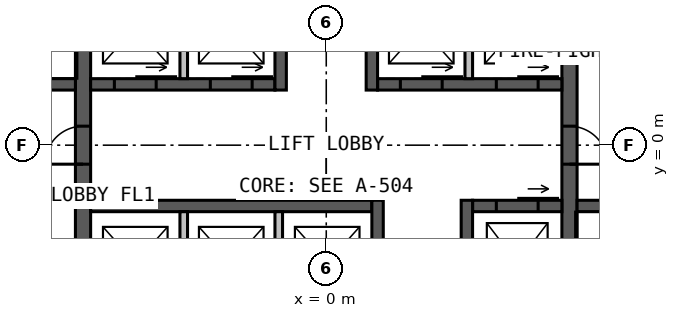
"""IFC4 building model, lengths in metres.
Left out: names, types, materials, properties, quantities, classifications, styles, units other than length and angle.
Written with IfcOpenShell. Run it as: python <this file> out.ifc"""

import sys

from ifc_helpers import new_model, si_unit, direction, frame, frame_2d, origin, place, context, subcontext, project, spatial, rectangle, extrude, element, fill, save


model = new_model("IFC4")
c1 = context("Model", 3, precision=1e-05, world=origin(), true_north=direction((0.0, 1.0)))
c2 = subcontext(c1, "Body", "Model", "MODEL_VIEW")
j1 = project(units=[si_unit("LENGTHUNIT", "METRE"), si_unit("PLANEANGLEUNIT", "RADIAN")], contexts=[c1])
p1 = place(None, origin())
s1 = spatial("IfcSite", under=j1, at=p1, CompositionType="ELEMENT")
p2 = place(p1, origin())
s2 = spatial("IfcBuilding", under=s1, at=p2, CompositionType="ELEMENT")
p3 = place(p2, frame((0.0, 0.0, 138.0)))
s3 = spatial("IfcBuildingStorey", under=s2, at=p3, CompositionType="ELEMENT", Elevation=138.0)
p4 = place(p3, frame((-6.4, -9.45, 0.0), z_axis=(0.0, 0.0, 1.0), x_axis=(0.0, 1.0, 0.0)))
e1 = element("IfcWall", 1, at=p4, inside=s3, PredefinedType="SOLIDWALL", context=c2, shape_type="SweptSolid", body=[
    extrude(rectangle(XDim=18.9, YDim=0.4, at=frame_2d((9.45, 0.0))), origin(), (0.0, 0.0, 1.0), 4.0),
])
p5 = place(p4, frame((8.95, 0.0, 0.0)))
e2 = element("IfcOpeningElement", 2, at=p5, cuts=e1, PredefinedType="OPENING", context=c2, shape_type="SweptSolid", body=[
    extrude(rectangle(XDim=1.0, YDim=2.2, at=frame_2d((0.5, 1.1))), frame((0.0, 0.21, 0.0), z_axis=(0.0, -1.0, 0.0), x_axis=(1.0, 0.0, 0.0)), (0.0, 0.0, 1.0), 0.42),
])
p6 = place(p3, frame((6.4, 9.45, 0.0), z_axis=(0.0, 0.0, 1.0), x_axis=(0.0, -1.0, 0.0)))
e3 = element("IfcWall", 3, at=p6, inside=s3, PredefinedType="SOLIDWALL", context=c2, shape_type="SweptSolid", body=[
    extrude(rectangle(XDim=18.9, YDim=0.4, at=frame_2d((9.45, 0.0))), origin(), (0.0, 0.0, 1.0), 4.0),
])
p7 = place(p6, frame((8.95, 0.0, 0.0)))
e4 = element("IfcOpeningElement", 4, at=p7, cuts=e3, PredefinedType="OPENING", context=c2, shape_type="SweptSolid", body=[
    extrude(rectangle(XDim=1.0, YDim=2.2, at=frame_2d((0.5, 1.1))), frame((0.0, 0.21, 0.0), z_axis=(0.0, -1.0, 0.0), x_axis=(1.0, 0.0, 0.0)), (0.0, 0.0, 1.0), 0.42),
])
p8 = place(p3, frame((-6.2, 1.6, 0.0), z_axis=(0.0, 0.0, 1.0), x_axis=(1.0, 0.0, 0.0)))
e5 = element("IfcWall", 5, at=p8, inside=s3, PredefinedType="SOLIDWALL", context=c2, shape_type="SweptSolid", body=[
    extrude(rectangle(XDim=4.85, YDim=0.3, at=frame_2d((2.425, 0.0))), origin(), (0.0, 0.0, 1.0), 4.0),
])
p9 = place(p8, frame((0.625, 0.0, 0.0)))
e6 = element("IfcOpeningElement", 6, at=p9, cuts=e5, PredefinedType="OPENING", context=c2, shape_type="SweptSolid", body=[
    extrude(rectangle(XDim=1.1, YDim=2.2, at=frame_2d((0.55, 1.1))), frame((0.0, 0.16, 0.0), z_axis=(0.0, -1.0, 0.0), x_axis=(1.0, 0.0, 0.0)), (0.0, 0.0, 1.0), 0.32),
])
p10 = place(p8, frame((3.15, 0.0, 0.0)))
e7 = element("IfcOpeningElement", 7, at=p10, cuts=e5, PredefinedType="OPENING", context=c2, shape_type="SweptSolid", body=[
    extrude(rectangle(XDim=1.1, YDim=2.2, at=frame_2d((0.55, 1.1))), frame((0.0, 0.16, 0.0), z_axis=(0.0, -1.0, 0.0), x_axis=(1.0, 0.0, 0.0)), (0.0, 0.0, 1.0), 0.32),
])
p11 = place(p3, frame((1.35, 1.6, 0.0), z_axis=(0.0, 0.0, 1.0), x_axis=(1.0, 0.0, 0.0)))
e8 = element("IfcWall", 8, at=p11, inside=s3, PredefinedType="SOLIDWALL", context=c2, shape_type="SweptSolid", body=[
    extrude(rectangle(XDim=4.85, YDim=0.3, at=frame_2d((2.425, 0.0))), origin(), (0.0, 0.0, 1.0), 4.0),
])
p12 = place(p11, frame((0.6, 0.0, 0.0)))
e9 = element("IfcOpeningElement", 9, at=p12, cuts=e8, PredefinedType="OPENING", context=c2, shape_type="SweptSolid", body=[
    extrude(rectangle(XDim=1.1, YDim=2.2, at=frame_2d((0.55, 1.1))), frame((0.0, 0.16, 0.0), z_axis=(0.0, -1.0, 0.0), x_axis=(1.0, 0.0, 0.0)), (0.0, 0.0, 1.0), 0.32),
])
p13 = place(p11, frame((3.125, 0.0, 0.0)))
e10 = element("IfcOpeningElement", 10, at=p13, cuts=e8, PredefinedType="OPENING", context=c2, shape_type="SweptSolid", body=[
    extrude(rectangle(XDim=1.1, YDim=2.2, at=frame_2d((0.55, 1.1))), frame((0.0, 0.16, 0.0), z_axis=(0.0, -1.0, 0.0), x_axis=(1.0, 0.0, 0.0)), (0.0, 0.0, 1.0), 0.32),
])
p14 = place(p3, frame((-1.2, 1.45, 0.0), z_axis=(0.0, 0.0, 1.0), x_axis=(0.0, 1.0, 0.0)))
e11 = element("IfcWall", 11, at=p14, inside=s3, PredefinedType="SOLIDWALL", context=c2, shape_type="SweptSolid", body=[
    extrude(rectangle(XDim=8.0, YDim=0.3, at=frame_2d((4.0, 0.0))), origin(), (0.0, 0.0, 1.0), 4.0),
])
p15 = place(p14, frame((5.05, 0.0, 0.0)))
e12 = element("IfcOpeningElement", 12, at=p15, cuts=e11, PredefinedType="OPENING", context=c2, shape_type="SweptSolid", body=[
    extrude(rectangle(XDim=1.0, YDim=2.2, at=frame_2d((0.5, 1.1))), frame((0.0, 0.16, 0.0), z_axis=(0.0, -1.0, 0.0), x_axis=(1.0, 0.0, 0.0)), (0.0, 0.0, 1.0), 0.32),
])
p16 = place(p3, frame((1.2, 1.45, 0.0), z_axis=(0.0, 0.0, 1.0), x_axis=(0.0, 1.0, 0.0)))
e13 = element("IfcWall", 13, at=p16, inside=s3, PredefinedType="SOLIDWALL", context=c2, shape_type="SweptSolid", body=[
    extrude(rectangle(XDim=8.0, YDim=0.3, at=frame_2d((4.0, 0.0))), origin(), (0.0, 0.0, 1.0), 4.0),
])
p17 = place(p16, frame((3.8, 0.0, 0.0)))
e14 = element("IfcOpeningElement", 14, at=p17, cuts=e13, PredefinedType="OPENING", context=c2, shape_type="SweptSolid", body=[
    extrude(rectangle(XDim=1.0, YDim=2.2, at=frame_2d((0.5, 1.1))), frame((0.0, 0.16, 0.0), z_axis=(0.0, -1.0, 0.0), x_axis=(1.0, 0.0, 0.0)), (0.0, 0.0, 1.0), 0.32),
])
p18 = place(p16, frame((6.15, 0.0, 0.0)))
e15 = element("IfcOpeningElement", 15, at=p18, cuts=e13, PredefinedType="OPENING", context=c2, shape_type="SweptSolid", body=[
    extrude(rectangle(XDim=1.0, YDim=2.2, at=frame_2d((0.5, 1.1))), frame((0.0, 0.16, 0.0), z_axis=(0.0, -1.0, 0.0), x_axis=(1.0, 0.0, 0.0)), (0.0, 0.0, 1.0), 0.32),
])
p19 = place(p3, frame((-6.2, -1.6, 0.0), z_axis=(0.0, 0.0, 1.0), x_axis=(1.0, 0.0, 0.0)))
e16 = element("IfcWall", 16, at=p19, inside=s3, PredefinedType="SOLIDWALL", context=c2, shape_type="SweptSolid", body=[
    extrude(rectangle(XDim=7.4, YDim=0.3, at=frame_2d((3.7, 0.0))), origin(), (0.0, 0.0, 1.0), 4.0),
])
p20 = place(p3, frame((3.85, -1.6, 0.0), z_axis=(0.0, 0.0, 1.0), x_axis=(1.0, 0.0, 0.0)))
e17 = element("IfcWall", 17, at=p20, inside=s3, PredefinedType="SOLIDWALL", context=c2, shape_type="SweptSolid", body=[
    extrude(rectangle(XDim=2.35, YDim=0.3, at=frame_2d((1.175, 0.0))), origin(), (0.0, 0.0, 1.0), 4.0),
])
p21 = place(p20, frame((0.625, 0.0, 0.0)))
e18 = element("IfcOpeningElement", 18, at=p21, cuts=e17, PredefinedType="OPENING", context=c2, shape_type="SweptSolid", body=[
    extrude(rectangle(XDim=1.1, YDim=2.2, at=frame_2d((0.55, 1.1))), frame((0.0, 0.16, 0.0), z_axis=(0.0, -1.0, 0.0), x_axis=(1.0, 0.0, 0.0)), (0.0, 0.0, 1.0), 0.32),
])
p22 = place(p3, frame((1.35, -1.45, 0.0), z_axis=(0.0, 0.0, 1.0), x_axis=(0.0, -1.0, 0.0)))
e19 = element("IfcWall", 19, at=p22, inside=s3, PredefinedType="SOLIDWALL", context=c2, shape_type="SweptSolid", body=[
    extrude(rectangle(XDim=8.0, YDim=0.3, at=frame_2d((4.0, 0.0))), origin(), (0.0, 0.0, 1.0), 4.0),
])
p23 = place(p22, frame((5.925, 0.0, 0.0)))
e20 = element("IfcOpeningElement", 20, at=p23, cuts=e19, PredefinedType="OPENING", context=c2, shape_type="SweptSolid", body=[
    extrude(rectangle(XDim=1.0, YDim=2.2, at=frame_2d((0.5, 1.1))), frame((0.0, 0.16, 0.0), z_axis=(0.0, -1.0, 0.0), x_axis=(1.0, 0.0, 0.0)), (0.0, 0.0, 1.0), 0.32),
])
p24 = place(p22, frame((3.525, 0.0, 0.0)))
e21 = element("IfcOpeningElement", 21, at=p24, cuts=e19, PredefinedType="OPENING", context=c2, shape_type="SweptSolid", body=[
    extrude(rectangle(XDim=0.9, YDim=2.2, at=frame_2d((0.45, 1.1))), frame((0.0, 0.16, 0.0), z_axis=(0.0, -1.0, 0.0), x_axis=(1.0, 0.0, 0.0)), (0.0, 0.0, 1.0), 0.32),
])
p25 = place(p3, frame((3.7, -1.45, 0.0), z_axis=(0.0, 0.0, 1.0), x_axis=(0.0, -1.0, 0.0)))
e22 = element("IfcWall", 22, at=p25, inside=s3, PredefinedType="SOLIDWALL", context=c2, shape_type="SweptSolid", body=[
    extrude(rectangle(XDim=8.0, YDim=0.3, at=frame_2d((4.0, 0.0))), origin(), (0.0, 0.0, 1.0), 4.0),
])
p26 = place(p25, frame((5.1, 0.0, 0.0)))
e23 = element("IfcOpeningElement", 23, at=p26, cuts=e22, PredefinedType="OPENING", context=c2, shape_type="SweptSolid", body=[
    extrude(rectangle(XDim=0.9, YDim=2.2, at=frame_2d((0.45, 1.1))), frame((0.0, 0.16, 0.0), z_axis=(0.0, -1.0, 0.0), x_axis=(1.0, 0.0, 0.0)), (0.0, 0.0, 1.0), 0.32),
])
p27 = place(p3, frame((-9.45, 1.6, 0.0), z_axis=(0.0, 0.0, 1.0), x_axis=(1.0, 0.0, 0.0)))
e24 = element("IfcWall", 24, at=p27, inside=s3, PredefinedType="SOLIDWALL", context=c2, shape_type="SweptSolid", body=[
    extrude(rectangle(XDim=2.85, YDim=0.3, at=frame_2d((1.425, 0.0))), origin(), (0.0, 0.0, 1.0), 4.0),
])
p28 = place(p27, frame((0.925, 0.0, 0.0)))
e25 = element("IfcOpeningElement", 25, at=p28, cuts=e24, PredefinedType="OPENING", context=c2, shape_type="SweptSolid", body=[
    extrude(rectangle(XDim=1.0, YDim=2.2, at=frame_2d((0.5, 1.1))), frame((0.0, 0.16, 0.0), z_axis=(0.0, -1.0, 0.0), x_axis=(1.0, 0.0, 0.0)), (0.0, 0.0, 1.0), 0.32),
])
p29 = place(p3, frame((6.6, -1.6, 0.0), z_axis=(0.0, 0.0, 1.0), x_axis=(1.0, 0.0, 0.0)))
e26 = element("IfcWall", 26, at=p29, inside=s3, PredefinedType="SOLIDWALL", context=c2, shape_type="SweptSolid", body=[
    extrude(rectangle(XDim=2.85, YDim=0.3, at=frame_2d((1.425, 0.0))), origin(), (0.0, 0.0, 1.0), 4.0),
])
p30 = place(p29, frame((0.925, 0.0, 0.0)))
e27 = element("IfcOpeningElement", 27, at=p30, cuts=e26, PredefinedType="OPENING", context=c2, shape_type="SweptSolid", body=[
    extrude(rectangle(XDim=1.0, YDim=2.2, at=frame_2d((0.5, 1.1))), frame((0.0, 0.16, 0.0), z_axis=(0.0, -1.0, 0.0), x_axis=(1.0, 0.0, 0.0)), (0.0, 0.0, 1.0), 0.32),
])
for number, where, z_axis, x_axis in (
    (28, (-3.75, 1.75, 0.0), (0.0, 0.0, 1.0), (0.0, 1.0, 0.0)),
    (29, (3.75, 1.75, 0.0), (0.0, 0.0, 1.0), (0.0, 1.0, 0.0)),
    (30, (-3.75, -1.75, 0.0), (0.0, 0.0, 1.0), (0.0, -1.0, 0.0)),
    (31, (-1.25, -1.75, 0.0), (0.0, 0.0, 1.0), (0.0, -1.0, 0.0)),
):
    element("IfcWall", number, at=place(p3, frame(where, z_axis=z_axis, x_axis=x_axis)), inside=s3, PredefinedType="SOLIDWALL", context=c2, shape_type="SweptSolid", body=[
        extrude(rectangle(XDim=2.7, YDim=0.2, at=frame_2d((1.35, 0.0))), origin(), (0.0, 0.0, 1.0), 3.75),
    ])
p31 = place(p5, origin())
e32 = element("IfcDoor", 32, at=p31, inside=s3, OperationType="SINGLE_SWING_LEFT", PredefinedType="DOOR", context=c2, shape_type="SweptSolid", body=[
    extrude(rectangle(XDim=1.0, YDim=2.2, at=frame_2d((0.5, 1.1))), frame((0.0, 0.025, 0.0), z_axis=(0.0, -1.0, 0.0), x_axis=(1.0, 0.0, 0.0)), (0.0, 0.0, 1.0), 0.05),
])
fill(e2, e32)
p32 = place(p7, origin())
e33 = element("IfcDoor", 33, at=p32, inside=s3, OperationType="SINGLE_SWING_RIGHT", PredefinedType="DOOR", context=c2, shape_type="SweptSolid", body=[
    extrude(rectangle(XDim=1.0, YDim=2.2, at=frame_2d((0.5, 1.1))), frame((0.0, 0.025, 0.0), z_axis=(0.0, -1.0, 0.0), x_axis=(1.0, 0.0, 0.0)), (0.0, 0.0, 1.0), 0.05),
])
fill(e4, e33)
p33 = place(p9, origin())
e34 = element("IfcDoor", 34, at=p33, inside=s3, OperationType="SLIDING_TO_LEFT", PredefinedType="DOOR", context=c2, shape_type="SweptSolid", body=[
    extrude(rectangle(XDim=1.1, YDim=2.2, at=frame_2d((0.55, 1.1))), frame((0.0, 0.025, 0.0), z_axis=(0.0, -1.0, 0.0), x_axis=(1.0, 0.0, 0.0)), (0.0, 0.0, 1.0), 0.05),
])
fill(e6, e34)
p34 = place(p10, origin())
e35 = element("IfcDoor", 35, at=p34, inside=s3, OperationType="SLIDING_TO_LEFT", PredefinedType="DOOR", context=c2, shape_type="SweptSolid", body=[
    extrude(rectangle(XDim=1.1, YDim=2.2, at=frame_2d((0.55, 1.1))), frame((0.0, 0.025, 0.0), z_axis=(0.0, -1.0, 0.0), x_axis=(1.0, 0.0, 0.0)), (0.0, 0.0, 1.0), 0.05),
])
fill(e7, e35)
p35 = place(p12, origin())
e36 = element("IfcDoor", 36, at=p35, inside=s3, OperationType="SLIDING_TO_LEFT", PredefinedType="DOOR", context=c2, shape_type="SweptSolid", body=[
    extrude(rectangle(XDim=1.1, YDim=2.2, at=frame_2d((0.55, 1.1))), frame((0.0, 0.025, 0.0), z_axis=(0.0, -1.0, 0.0), x_axis=(1.0, 0.0, 0.0)), (0.0, 0.0, 1.0), 0.05),
])
fill(e9, e36)
p36 = place(p13, origin())
e37 = element("IfcDoor", 37, at=p36, inside=s3, OperationType="SLIDING_TO_LEFT", PredefinedType="DOOR", context=c2, shape_type="SweptSolid", body=[
    extrude(rectangle(XDim=1.1, YDim=2.2, at=frame_2d((0.55, 1.1))), frame((0.0, 0.025, 0.0), z_axis=(0.0, -1.0, 0.0), x_axis=(1.0, 0.0, 0.0)), (0.0, 0.0, 1.0), 0.05),
])
fill(e10, e37)
p37 = place(p21, origin())
e38 = element("IfcDoor", 38, at=p37, inside=s3, OperationType="SLIDING_TO_LEFT", PredefinedType="DOOR", context=c2, shape_type="SweptSolid", body=[
    extrude(rectangle(XDim=1.1, YDim=2.2, at=frame_2d((0.55, 1.1))), frame((0.0, 0.025, 0.0), z_axis=(0.0, -1.0, 0.0), x_axis=(1.0, 0.0, 0.0)), (0.0, 0.0, 1.0), 0.05),
])
fill(e18, e38)
save(model, sys.argv[1])
